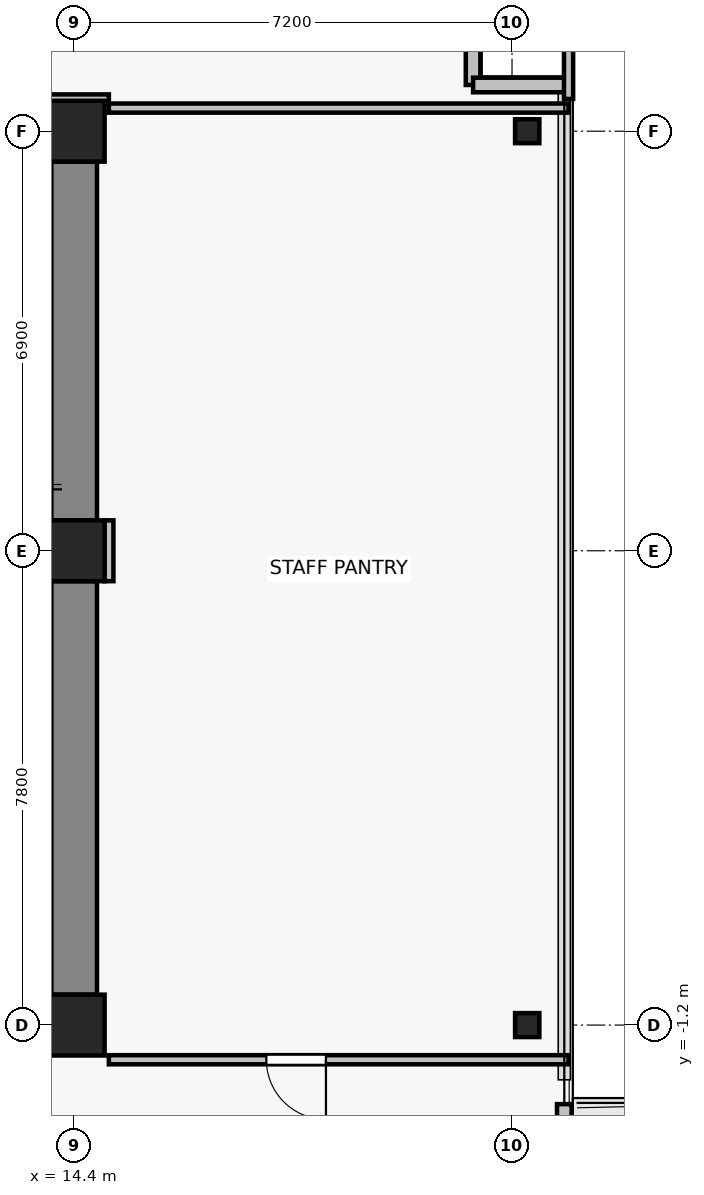
"""IFC4 building model, lengths in metres.
Left out: names, types, materials, properties, quantities, classifications, styles, units other than length and angle.
Written with IfcOpenShell. Run it as: python <this file> out.ifc"""

import sys

from ifc_helpers import new_model, si_unit, direction, frame, frame_2d, origin, origin_2d, place, context, subcontext, project, spatial, rectangle, i_section, extrude, source, transform, mapped, element, fill, save


model = new_model("IFC4")
c1 = context("Model", 3, precision=1e-05, world=origin(), true_north=direction((0.0, 1.0)))
c2 = subcontext(c1, "Body", "Model", "MODEL_VIEW")
j1 = project(units=[si_unit("LENGTHUNIT", "METRE"), si_unit("PLANEANGLEUNIT", "RADIAN")], contexts=[c1])
p1 = place(None, origin())
s1 = spatial("IfcSite", under=j1, at=p1, CompositionType="ELEMENT")
p2 = place(p1, origin())
s2 = spatial("IfcBuilding", under=s1, at=p2, CompositionType="ELEMENT")
p3 = place(p2, frame((0.0, 0.0, 169.3)))
s3 = spatial("IfcBuildingStorey", under=s2, at=p3, CompositionType="ELEMENT", Elevation=169.3)
for number, where, z_axis, x_axis in (
    (1, (14.4, -1.2, 0.0), (0.0, 0.0, 1.0), (1.0, 0.0, 0.0)),
    (2, (14.4, 6.6, 0.0), (0.0, 0.0, 1.0), (1.0, 0.0, 0.0)),
    (3, (14.4, 13.5, 0.0), (0.0, 0.0, 1.0), (1.0, 0.0, 0.0)),
):
    element("IfcColumn", number, at=place(p3, frame(where, z_axis=z_axis, x_axis=x_axis)), inside=s3, PredefinedType="COLUMN", context=c2, shape_type="SweptSolid", body=[
        extrude(rectangle(XDim=1.0, YDim=1.0, at=origin_2d()), origin(), (0.0, 0.0, 1.0), 3.3),
    ])
for number, where, z_axis, x_axis in (
    (4, (21.85, -1.2, 0.0), (0.0, 0.0, 1.0), (1.0, 0.0, 0.0)),
    (5, (21.85, 13.5, 0.0), (0.0, 0.0, 1.0), (1.0, 0.0, 0.0)),
):
    element("IfcColumn", number, at=place(p3, frame(where, z_axis=z_axis, x_axis=x_axis)), inside=s3, PredefinedType="COLUMN", context=c2, shape_type="SweptSolid", body=[
        extrude(i_section(OverallWidth=0.399, OverallDepth=0.394, WebThickness=0.023, FlangeThickness=0.037, FilletRadius=0.015, at=origin_2d()), origin(), (0.0, 0.0, 1.0), 3.3),
    ])
p4 = place(p3, frame((14.4, -0.7, 0.0), z_axis=(0.0, 0.0, 1.0), x_axis=(0.0, 1.0, 0.0)))
e6 = element("IfcWall", 6, at=p4, inside=s3, PredefinedType="SHEAR", context=c2, shape_type="SweptSolid", body=[
    extrude(rectangle(XDim=6.8, YDim=0.75, at=frame_2d((3.4, 0.0))), origin(), (0.0, 0.0, 1.0), 3.075),
])
p5 = place(p3, frame((14.4, 7.1, 0.0), z_axis=(0.0, 0.0, 1.0), x_axis=(0.0, 1.0, 0.0)))
e7 = element("IfcWall", 7, at=p5, inside=s3, PredefinedType="SHEAR", context=c2, shape_type="SweptSolid", body=[
    extrude(rectangle(XDim=5.9, YDim=0.75, at=frame_2d((2.95, 0.0))), origin(), (0.0, 0.0, 1.0), 3.075),
])
p6 = place(p3, frame((22.46, -2.5, 0.0), z_axis=(0.0, 0.0, 1.0), x_axis=(0.0, -1.0, 0.0)))
e8 = element("IfcWall", 8, at=p6, inside=s3, PredefinedType="SOLIDWALL", context=c2, shape_type="SweptSolid", body=[
    extrude(rectangle(XDim=5.8, YDim=0.24, at=frame_2d((2.9, 0.0))), origin(), (0.0, 0.0, 1.0), 3.075),
])
p7 = place(p6, frame((1.566, 0.0, 0.0)))
e9 = element("IfcOpeningElement", 9, at=p7, cuts=e8, PredefinedType="OPENING", context=c2, shape_type="SweptSolid", body=[
    extrude(rectangle(XDim=1.0, YDim=2.2, at=frame_2d((0.5, 1.1))), frame((0.0, 0.13, 0.0), z_axis=(0.0, -1.0, 0.0), x_axis=(1.0, 0.0, 0.0)), (0.0, 0.0, 1.0), 0.26),
])
p8 = place(p6, frame((2.916, 0.0, 0.85)))
e10 = element("IfcOpeningElement", 10, at=p8, cuts=e8, PredefinedType="OPENING", context=c2, shape_type="SweptSolid", body=[
    extrude(rectangle(XDim=0.9, YDim=1.35, at=frame_2d((0.45, 0.675))), frame((0.0, 0.13, 0.0), z_axis=(0.0, -1.0, 0.0), x_axis=(1.0, 0.0, 0.0)), (0.0, 0.0, 1.0), 0.26),
])
for number, where, z_axis, x_axis in (
    (11, (20.96, 14.26, 0.0), (0.0, 0.0, 1.0), (0.0, 1.0, 0.0)),
    (12, (22.46, 14.26, 0.0), (0.0, 0.0, 1.0), (-1.0, 0.0, 0.0)),
):
    element("IfcWall", number, at=place(p3, frame(where, z_axis=z_axis, x_axis=x_axis)), inside=s3, PredefinedType="SOLIDWALL", context=c2, shape_type="SweptSolid", body=[
        extrude(rectangle(XDim=1.5, YDim=0.24, at=frame_2d((0.75, 0.0))), origin(), (0.0, 0.0, 1.0), 3.075),
    ])
p9 = place(p3, frame((22.53, -1.77, 0.0), z_axis=(0.0, 0.0, 1.0), x_axis=(-1.0, 0.0, 0.0)))
e13 = element("IfcWall", 13, at=p9, inside=s3, PredefinedType="PARTITIONING", context=c2, shape_type="SweptSolid", body=[
    extrude(rectangle(XDim=7.56, YDim=0.15, at=frame_2d((3.78, 0.0))), origin(), (0.0, 0.0, 1.0), 3.075),
])
p10 = place(p9, frame((3.99, 0.0, 0.0)))
e14 = element("IfcOpeningElement", 14, at=p10, cuts=e13, PredefinedType="OPENING", context=c2, shape_type="SweptSolid", body=[
    extrude(rectangle(XDim=0.98, YDim=2.15, at=frame_2d((0.49, 1.075))), frame((0.0, 0.085, 0.0), z_axis=(0.0, -1.0, 0.0), x_axis=(1.0, 0.0, 0.0)), (0.0, 0.0, 1.0), 0.17),
])
p11 = place(p3, frame((14.97, 13.88, 0.0), z_axis=(0.0, 0.0, 1.0), x_axis=(1.0, 0.0, 0.0)))
e15 = element("IfcWall", 15, at=p11, inside=s3, PredefinedType="PARTITIONING", context=c2, shape_type="SweptSolid", body=[
    extrude(rectangle(XDim=7.56, YDim=0.15, at=frame_2d((3.78, 0.0))), origin(), (0.0, 0.0, 1.0), 3.075),
])
p12 = place(p3, frame((14.97, 6.1, 0.0), z_axis=(0.0, 0.0, 1.0), x_axis=(0.0, 1.0, 0.0)))
e16 = element("IfcWall", 16, at=p12, inside=s3, PredefinedType="PARTITIONING", context=c2, shape_type="SweptSolid", body=[
    extrude(rectangle(XDim=1.0, YDim=0.15, at=frame_2d((0.5, 0.0))), origin(), (0.0, 0.0, 1.0), 3.075),
])
p13 = place(p3, frame((14.97, 14.03, 0.0), z_axis=(0.0, 0.0, 1.0), x_axis=(-1.0, 0.0, 0.0)))
e17 = element("IfcWall", 17, at=p13, inside=s3, PredefinedType="PARTITIONING", context=c2, shape_type="SweptSolid", body=[
    extrude(rectangle(XDim=1.07, YDim=0.15, at=frame_2d((0.535, 0.0))), origin(), (0.0, 0.0, 1.0), 2.565),
])
p14 = place(p3, frame((22.53, 17.33, 0.0), z_axis=(0.0, 0.0, 1.0), x_axis=(0.0, -1.0, 0.0)))
e18 = element("IfcWall", 18, at=p14, inside=s3, PredefinedType="PARTITIONING", context=c2, shape_type="SweptSolid", body=[
    extrude(rectangle(XDim=3.3, YDim=0.15, at=frame_2d((1.65, 0.0))), origin(), (0.0, 0.0, 1.0), 3.075),
])
m1 = source(origin(), c2, "Body", "SweptSolid", [
    extrude(rectangle(XDim=0.98, YDim=2.15, at=frame_2d((0.49, 1.075))), frame((0.0, 0.025, 0.0), z_axis=(0.0, -1.0, 0.0), x_axis=(1.0, 0.0, 0.0)), (0.0, 0.0, 1.0), 0.05),
])
p15 = place(p10, origin())
e19 = element("IfcDoor", 19, at=p15, inside=s3, OperationType="SINGLE_SWING_LEFT", PredefinedType="DOOR", context=c2, shape_type="MappedRepresentation", body=[
    mapped(m1, transform((0.0, 0.0, 0.0), x_axis=(1.0, 0.0, 0.0), y_axis=(0.0, 1.0, 0.0), z_axis=(0.0, 0.0, 1.0), scale=1.0)),
])
fill(e14, e19)
save(model, sys.argv[1])
